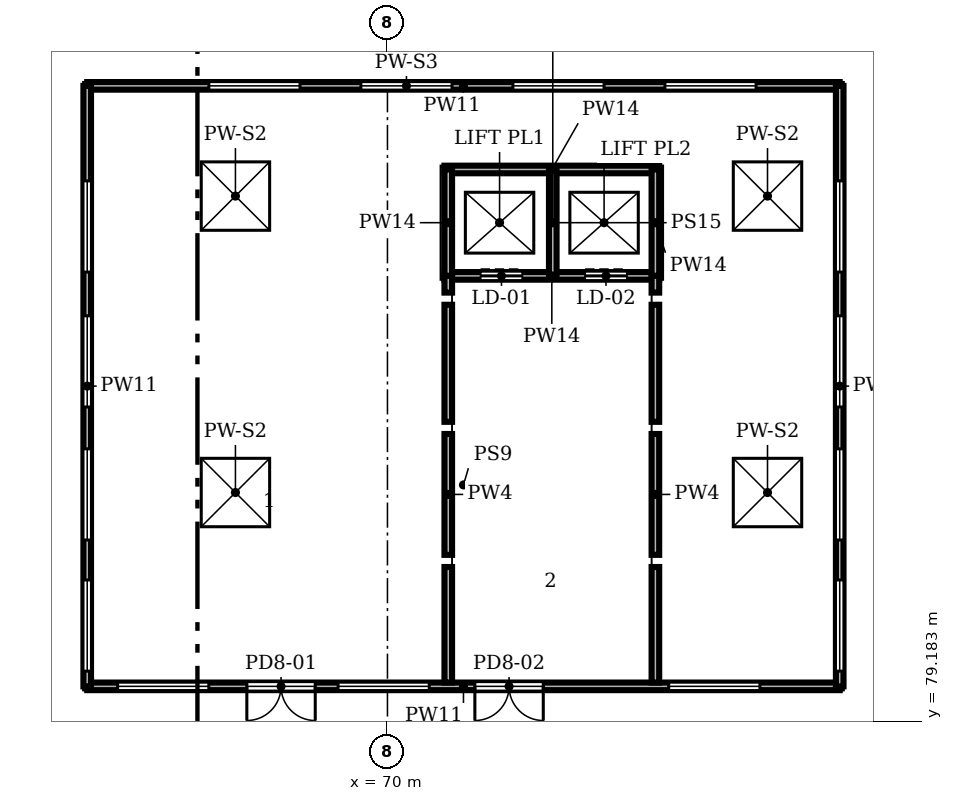
"""IFC4 building model, lengths in metres.
Left out: names, types, materials, properties, quantities, classifications, styles, units other than length and angle.
Written with IfcOpenShell. Run it as: python <this file> out.ifc"""

import sys

from ifc_helpers import new_model, si_unit, direction, frame, frame_2d, origin, origin_2d, place, context, subcontext, project, spatial, rectangle, extrude, element, fill, save


model = new_model("IFC4")
c1 = context("Model", 3, precision=1e-05, world=origin(), true_north=direction((0.0, 1.0)))
c2 = subcontext(c1, "Body", "Model", "MODEL_VIEW")
j1 = project(units=[si_unit("LENGTHUNIT", "METRE"), si_unit("PLANEANGLEUNIT", "RADIAN")], contexts=[c1])
p1 = place(None, origin())
s1 = spatial("IfcSite", under=j1, at=p1, CompositionType="ELEMENT")
p2 = place(p1, origin())
s2 = spatial("IfcBuilding", under=s1, at=p2, CompositionType="ELEMENT")
p3 = place(p2, frame((0.0, 0.0, 6.0)))
s3 = spatial("IfcBuildingStorey", under=s2, at=p3, CompositionType="ELEMENT", Elevation=6.0)
p4 = place(p3, frame((62.1, 80.1, -0.04), z_axis=(0.0, 0.0, 1.0), x_axis=(1.0, 0.0, 0.0)))
e1 = element("IfcWall", 1, at=p4, inside=s3, PredefinedType="STANDARD", context=c2, shape_type="SweptSolid", body=[
    extrude(rectangle(XDim=19.8, YDim=0.2, at=frame_2d((9.9, 0.0))), origin(), (0.0, 0.0, 1.0), 4.54),
])
p5 = place(p4, frame((0.8, 0.0, 0.5)))
e2 = element("IfcOpeningElement", 2, at=p5, cuts=e1, PredefinedType="OPENING", context=c2, shape_type="SweptSolid", body=[
    extrude(rectangle(XDim=2.4, YDim=2.6, at=frame_2d((1.2, 1.3))), frame((0.0, 0.11, 0.0), z_axis=(0.0, -1.0, 0.0), x_axis=(1.0, 0.0, 0.0)), (0.0, 0.0, 1.0), 0.22),
])
p6 = place(p4, frame((4.2, 0.0, 0.04)))
e3 = element("IfcOpeningElement", 3, at=p6, cuts=e1, PredefinedType="OPENING", context=c2, shape_type="SweptSolid", body=[
    extrude(rectangle(XDim=1.8, YDim=2.4, at=frame_2d((0.9, 1.2))), frame((0.0, 0.11, 0.0), z_axis=(0.0, -1.0, 0.0), x_axis=(1.0, 0.0, 0.0)), (0.0, 0.0, 1.0), 0.22),
])
p7 = place(p4, frame((6.6, 0.0, 0.5)))
e4 = element("IfcOpeningElement", 4, at=p7, cuts=e1, PredefinedType="OPENING", context=c2, shape_type="SweptSolid", body=[
    extrude(rectangle(XDim=2.4, YDim=2.6, at=frame_2d((1.2, 1.3))), frame((0.0, 0.11, 0.0), z_axis=(0.0, -1.0, 0.0), x_axis=(1.0, 0.0, 0.0)), (0.0, 0.0, 1.0), 0.22),
])
p8 = place(p4, frame((10.2, 0.0, 0.04)))
e5 = element("IfcOpeningElement", 5, at=p8, cuts=e1, PredefinedType="OPENING", context=c2, shape_type="SweptSolid", body=[
    extrude(rectangle(XDim=1.8, YDim=2.4, at=frame_2d((0.9, 1.2))), frame((0.0, 0.11, 0.0), z_axis=(0.0, -1.0, 0.0), x_axis=(1.0, 0.0, 0.0)), (0.0, 0.0, 1.0), 0.22),
])
p9 = place(p4, frame((15.3, 0.0, 0.5)))
e6 = element("IfcOpeningElement", 6, at=p9, cuts=e1, PredefinedType="OPENING", context=c2, shape_type="SweptSolid", body=[
    extrude(rectangle(XDim=2.4, YDim=2.6, at=frame_2d((1.2, 1.3))), frame((0.0, 0.11, 0.0), z_axis=(0.0, -1.0, 0.0), x_axis=(1.0, 0.0, 0.0)), (0.0, 0.0, 1.0), 0.22),
])
p10 = place(p3, frame((81.9, 80.1, -0.04), z_axis=(0.0, 0.0, 1.0), x_axis=(0.0, 1.0, 0.0)))
e7 = element("IfcWall", 7, at=p10, inside=s3, PredefinedType="STANDARD", context=c2, shape_type="SweptSolid", body=[
    extrude(rectangle(XDim=15.8, YDim=0.2, at=frame_2d((7.9, 0.0))), origin(), (0.0, 0.0, 1.0), 4.54),
])
p11 = place(p10, frame((0.4, 0.0, 0.5)))
e8 = element("IfcOpeningElement", 8, at=p11, cuts=e7, PredefinedType="OPENING", context=c2, shape_type="SweptSolid", body=[
    extrude(rectangle(XDim=2.4, YDim=2.6, at=frame_2d((1.2, 1.3))), frame((0.0, 0.11, 0.0), z_axis=(0.0, -1.0, 0.0), x_axis=(1.0, 0.0, 0.0)), (0.0, 0.0, 1.0), 0.22),
])
p12 = place(p10, frame((3.85, 0.0, 0.5)))
e9 = element("IfcOpeningElement", 9, at=p12, cuts=e7, PredefinedType="OPENING", context=c2, shape_type="SweptSolid", body=[
    extrude(rectangle(XDim=2.4, YDim=2.6, at=frame_2d((1.2, 1.3))), frame((0.0, 0.11, 0.0), z_axis=(0.0, -1.0, 0.0), x_axis=(1.0, 0.0, 0.0)), (0.0, 0.0, 1.0), 0.22),
])
p13 = place(p10, frame((7.35, 0.0, 0.5)))
e10 = element("IfcOpeningElement", 10, at=p13, cuts=e7, PredefinedType="OPENING", context=c2, shape_type="SweptSolid", body=[
    extrude(rectangle(XDim=2.4, YDim=2.6, at=frame_2d((1.2, 1.3))), frame((0.0, 0.11, 0.0), z_axis=(0.0, -1.0, 0.0), x_axis=(1.0, 0.0, 0.0)), (0.0, 0.0, 1.0), 0.22),
])
p14 = place(p10, frame((10.9, 0.0, 0.5)))
e11 = element("IfcOpeningElement", 11, at=p14, cuts=e7, PredefinedType="OPENING", context=c2, shape_type="SweptSolid", body=[
    extrude(rectangle(XDim=2.4, YDim=2.6, at=frame_2d((1.2, 1.3))), frame((0.0, 0.11, 0.0), z_axis=(0.0, -1.0, 0.0), x_axis=(1.0, 0.0, 0.0)), (0.0, 0.0, 1.0), 0.22),
])
p15 = place(p3, frame((81.9, 95.9, -0.04), z_axis=(0.0, 0.0, 1.0), x_axis=(-1.0, 0.0, 0.0)))
e12 = element("IfcWall", 12, at=p15, inside=s3, PredefinedType="STANDARD", context=c2, shape_type="SweptSolid", body=[
    extrude(rectangle(XDim=19.8, YDim=0.2, at=frame_2d((9.9, 0.0))), origin(), (0.0, 0.0, 1.0), 4.54),
])
p16 = place(p15, frame((2.2, 0.0, 0.5)))
e13 = element("IfcOpeningElement", 13, at=p16, cuts=e12, PredefinedType="OPENING", context=c2, shape_type="SweptSolid", body=[
    extrude(rectangle(XDim=2.4, YDim=2.6, at=frame_2d((1.2, 1.3))), frame((0.0, 0.11, 0.0), z_axis=(0.0, -1.0, 0.0), x_axis=(1.0, 0.0, 0.0)), (0.0, 0.0, 1.0), 0.22),
])
p17 = place(p15, frame((6.2, 0.0, 0.5)))
e14 = element("IfcOpeningElement", 14, at=p17, cuts=e12, PredefinedType="OPENING", context=c2, shape_type="SweptSolid", body=[
    extrude(rectangle(XDim=2.4, YDim=2.6, at=frame_2d((1.2, 1.3))), frame((0.0, 0.11, 0.0), z_axis=(0.0, -1.0, 0.0), x_axis=(1.0, 0.0, 0.0)), (0.0, 0.0, 1.0), 0.22),
])
p18 = place(p15, frame((10.2, 0.0, 0.5)))
e15 = element("IfcOpeningElement", 15, at=p18, cuts=e12, PredefinedType="OPENING", context=c2, shape_type="SweptSolid", body=[
    extrude(rectangle(XDim=2.4, YDim=2.6, at=frame_2d((1.2, 1.3))), frame((0.0, 0.11, 0.0), z_axis=(0.0, -1.0, 0.0), x_axis=(1.0, 0.0, 0.0)), (0.0, 0.0, 1.0), 0.22),
])
p19 = place(p15, frame((14.2, 0.0, 0.5)))
e16 = element("IfcOpeningElement", 16, at=p19, cuts=e12, PredefinedType="OPENING", context=c2, shape_type="SweptSolid", body=[
    extrude(rectangle(XDim=2.4, YDim=2.6, at=frame_2d((1.2, 1.3))), frame((0.0, 0.11, 0.0), z_axis=(0.0, -1.0, 0.0), x_axis=(1.0, 0.0, 0.0)), (0.0, 0.0, 1.0), 0.22),
])
p20 = place(p3, frame((62.1, 95.9, -0.04), z_axis=(0.0, 0.0, 1.0), x_axis=(0.0, -1.0, 0.0)))
e17 = element("IfcWall", 17, at=p20, inside=s3, PredefinedType="STANDARD", context=c2, shape_type="SweptSolid", body=[
    extrude(rectangle(XDim=15.8, YDim=0.2, at=frame_2d((7.9, 0.0))), origin(), (0.0, 0.0, 1.0), 4.54),
])
p21 = place(p20, frame((2.5, 0.0, 0.5)))
e18 = element("IfcOpeningElement", 18, at=p21, cuts=e17, PredefinedType="OPENING", context=c2, shape_type="SweptSolid", body=[
    extrude(rectangle(XDim=2.4, YDim=2.6, at=frame_2d((1.2, 1.3))), frame((0.0, 0.11, 0.0), z_axis=(0.0, -1.0, 0.0), x_axis=(1.0, 0.0, 0.0)), (0.0, 0.0, 1.0), 0.22),
])
p22 = place(p20, frame((6.05, 0.0, 0.5)))
e19 = element("IfcOpeningElement", 19, at=p22, cuts=e17, PredefinedType="OPENING", context=c2, shape_type="SweptSolid", body=[
    extrude(rectangle(XDim=2.4, YDim=2.6, at=frame_2d((1.2, 1.3))), frame((0.0, 0.11, 0.0), z_axis=(0.0, -1.0, 0.0), x_axis=(1.0, 0.0, 0.0)), (0.0, 0.0, 1.0), 0.22),
])
p23 = place(p20, frame((9.55, 0.0, 0.5)))
e20 = element("IfcOpeningElement", 20, at=p23, cuts=e17, PredefinedType="OPENING", context=c2, shape_type="SweptSolid", body=[
    extrude(rectangle(XDim=2.4, YDim=2.6, at=frame_2d((1.2, 1.3))), frame((0.0, 0.11, 0.0), z_axis=(0.0, -1.0, 0.0), x_axis=(1.0, 0.0, 0.0)), (0.0, 0.0, 1.0), 0.22),
])
p24 = place(p20, frame((13.0, 0.0, 0.5)))
e21 = element("IfcOpeningElement", 21, at=p24, cuts=e17, PredefinedType="OPENING", context=c2, shape_type="SweptSolid", body=[
    extrude(rectangle(XDim=2.4, YDim=2.6, at=frame_2d((1.2, 1.3))), frame((0.0, 0.11, 0.0), z_axis=(0.0, -1.0, 0.0), x_axis=(1.0, 0.0, 0.0)), (0.0, 0.0, 1.0), 0.22),
])
p25 = place(p3, frame((71.5, 90.9, 0.0), z_axis=(0.0, 0.0, 1.0), x_axis=(1.0, 0.0, 0.0)))
e22 = element("IfcWall", 22, at=p25, inside=s3, PredefinedType="SOLIDWALL", context=c2, shape_type="SweptSolid", body=[
    extrude(rectangle(XDim=5.65, YDim=0.2, at=frame_2d((2.825, 0.0))), origin(), (0.0, 0.0, 1.0), 5.5),
])
p26 = place(p25, frame((0.95, 0.0, 0.0)))
e23 = element("IfcOpeningElement", 23, at=p26, cuts=e22, PredefinedType="OPENING", context=c2, shape_type="SweptSolid", body=[
    extrude(rectangle(XDim=1.1, YDim=2.1, at=frame_2d((0.55, 1.05))), frame((0.0, 0.11, 0.0), z_axis=(0.0, -1.0, 0.0), x_axis=(1.0, 0.0, 0.0)), (0.0, 0.0, 1.0), 0.22),
])
p27 = place(p25, frame((3.7, 0.0, 0.0)))
e24 = element("IfcOpeningElement", 24, at=p27, cuts=e22, PredefinedType="OPENING", context=c2, shape_type="SweptSolid", body=[
    extrude(rectangle(XDim=1.1, YDim=2.1, at=frame_2d((0.55, 1.05))), frame((0.0, 0.11, 0.0), z_axis=(0.0, -1.0, 0.0), x_axis=(1.0, 0.0, 0.0)), (0.0, 0.0, 1.0), 0.22),
])
p28 = place(p3, frame((71.5, 93.7, 0.0), z_axis=(0.0, 0.0, 1.0), x_axis=(1.0, 0.0, 0.0)))
e25 = element("IfcWall", 25, at=p28, inside=s3, PredefinedType="SOLIDWALL", context=c2, shape_type="SweptSolid", body=[
    extrude(rectangle(XDim=5.65, YDim=0.2, at=frame_2d((2.825, 0.0))), origin(), (0.0, 0.0, 1.0), 5.5),
])
for number, where, z_axis, x_axis in (
    (26, (71.6, 90.9, 0.0), (0.0, 0.0, 1.0), (0.0, 1.0, 0.0)),
    (27, (74.35, 90.9, 0.0), (0.0, 0.0, 1.0), (0.0, 1.0, 0.0)),
    (28, (77.05, 90.9, 0.0), (0.0, 0.0, 1.0), (0.0, 1.0, 0.0)),
):
    element("IfcWall", number, at=place(p3, frame(where, z_axis=z_axis, x_axis=x_axis)), inside=s3, PredefinedType="SOLIDWALL", context=c2, shape_type="SweptSolid", body=[
        extrude(rectangle(XDim=2.8, YDim=0.2, at=frame_2d((1.4, 0.0))), origin(), (0.0, 0.0, 1.0), 5.5),
    ])
p29 = place(p3, frame((71.6, 80.2, 0.0), z_axis=(0.0, 0.0, 1.0), x_axis=(0.0, 1.0, 0.0)))
e29 = element("IfcWall", 29, at=p29, inside=s3, PredefinedType="PARTITIONING", context=c2, shape_type="SweptSolid", body=[
    extrude(rectangle(XDim=3.04, YDim=0.2, at=frame_2d((1.52, 0.0))), origin(), (0.0, 0.0, 1.0), 4.5),
])
p30 = place(p3, frame((71.6, 83.56, 0.0), z_axis=(0.0, 0.0, 1.0), x_axis=(0.0, 1.0, 0.0)))
e30 = element("IfcWall", 30, at=p30, inside=s3, PredefinedType="PARTITIONING", context=c2, shape_type="SweptSolid", body=[
    extrude(rectangle(XDim=3.18, YDim=0.2, at=frame_2d((1.59, 0.0))), origin(), (0.0, 0.0, 1.0), 4.5),
])
p31 = place(p3, frame((71.6, 87.06, 0.0), z_axis=(0.0, 0.0, 1.0), x_axis=(0.0, 1.0, 0.0)))
e31 = element("IfcWall", 31, at=p31, inside=s3, PredefinedType="PARTITIONING", context=c2, shape_type="SweptSolid", body=[
    extrude(rectangle(XDim=3.08, YDim=0.2, at=frame_2d((1.54, 0.0))), origin(), (0.0, 0.0, 1.0), 4.5),
])
p32 = place(p3, frame((71.6, 90.46, 0.0), z_axis=(0.0, 0.0, 1.0), x_axis=(0.0, 1.0, 0.0)))
e32 = element("IfcWall", 32, at=p32, inside=s3, PredefinedType="PARTITIONING", context=c2, shape_type="SweptSolid", body=[
    extrude(rectangle(XDim=0.44, YDim=0.2, at=frame_2d((0.22, 0.0))), origin(), (0.0, 0.0, 1.0), 4.5),
])
p33 = place(p3, frame((77.05, 80.2, 0.0), z_axis=(0.0, 0.0, 1.0), x_axis=(0.0, 1.0, 0.0)))
e33 = element("IfcWall", 33, at=p33, inside=s3, PredefinedType="PARTITIONING", context=c2, shape_type="SweptSolid", body=[
    extrude(rectangle(XDim=3.04, YDim=0.2, at=frame_2d((1.52, 0.0))), origin(), (0.0, 0.0, 1.0), 4.5),
])
p34 = place(p3, frame((77.05, 83.56, 0.0), z_axis=(0.0, 0.0, 1.0), x_axis=(0.0, 1.0, 0.0)))
e34 = element("IfcWall", 34, at=p34, inside=s3, PredefinedType="PARTITIONING", context=c2, shape_type="SweptSolid", body=[
    extrude(rectangle(XDim=3.18, YDim=0.2, at=frame_2d((1.59, 0.0))), origin(), (0.0, 0.0, 1.0), 4.5),
])
p35 = place(p3, frame((77.05, 87.06, 0.0), z_axis=(0.0, 0.0, 1.0), x_axis=(0.0, 1.0, 0.0)))
e35 = element("IfcWall", 35, at=p35, inside=s3, PredefinedType="PARTITIONING", context=c2, shape_type="SweptSolid", body=[
    extrude(rectangle(XDim=3.08, YDim=0.2, at=frame_2d((1.54, 0.0))), origin(), (0.0, 0.0, 1.0), 4.5),
])
p36 = place(p3, frame((77.05, 90.46, 0.0), z_axis=(0.0, 0.0, 1.0), x_axis=(0.0, 1.0, 0.0)))
e36 = element("IfcWall", 36, at=p36, inside=s3, PredefinedType="PARTITIONING", context=c2, shape_type="SweptSolid", body=[
    extrude(rectangle(XDim=0.44, YDim=0.2, at=frame_2d((0.22, 0.0))), origin(), (0.0, 0.0, 1.0), 4.5),
])
p37 = place(p5, origin())
e37 = element("IfcWindow", 37, at=p37, inside=s3, PartitioningType="SINGLE_PANEL", PredefinedType="WINDOW", context=c2, shape_type="SweptSolid", body=[
    extrude(rectangle(XDim=2.4, YDim=2.6, at=frame_2d((1.2, 1.3))), frame((0.0, 0.03, 0.0), z_axis=(0.0, -1.0, 0.0), x_axis=(1.0, 0.0, 0.0)), (0.0, 0.0, 1.0), 0.06),
])
fill(e2, e37)
p38 = place(p6, frame((1.8, 0.0, 0.0), z_axis=(0.0, 0.0, 1.0), x_axis=(-1.0, 0.0, 0.0)))
e38 = element("IfcDoor", 38, at=p38, inside=s3, OperationType="DOUBLE_DOOR_SINGLE_SWING", PredefinedType="DOOR", context=c2, shape_type="SweptSolid", body=[
    extrude(rectangle(XDim=1.8, YDim=2.4, at=frame_2d((0.9, 1.2))), frame((0.0, 0.025, 0.0), z_axis=(0.0, -1.0, 0.0), x_axis=(1.0, 0.0, 0.0)), (0.0, 0.0, 1.0), 0.05),
])
fill(e3, e38)
p39 = place(p7, origin())
e39 = element("IfcWindow", 39, at=p39, inside=s3, PartitioningType="SINGLE_PANEL", PredefinedType="WINDOW", context=c2, shape_type="SweptSolid", body=[
    extrude(rectangle(XDim=2.4, YDim=2.6, at=frame_2d((1.2, 1.3))), frame((0.0, 0.03, 0.0), z_axis=(0.0, -1.0, 0.0), x_axis=(1.0, 0.0, 0.0)), (0.0, 0.0, 1.0), 0.06),
])
fill(e4, e39)
p40 = place(p8, frame((1.8, 0.0, 0.0), z_axis=(0.0, 0.0, 1.0), x_axis=(-1.0, 0.0, 0.0)))
e40 = element("IfcDoor", 40, at=p40, inside=s3, OperationType="DOUBLE_DOOR_SINGLE_SWING", PredefinedType="DOOR", context=c2, shape_type="SweptSolid", body=[
    extrude(rectangle(XDim=1.8, YDim=2.4, at=frame_2d((0.9, 1.2))), frame((0.0, 0.025, 0.0), z_axis=(0.0, -1.0, 0.0), x_axis=(1.0, 0.0, 0.0)), (0.0, 0.0, 1.0), 0.05),
])
fill(e5, e40)
p41 = place(p9, origin())
e41 = element("IfcWindow", 41, at=p41, inside=s3, PartitioningType="SINGLE_PANEL", PredefinedType="WINDOW", context=c2, shape_type="SweptSolid", body=[
    extrude(rectangle(XDim=2.4, YDim=2.6, at=frame_2d((1.2, 1.3))), frame((0.0, 0.03, 0.0), z_axis=(0.0, -1.0, 0.0), x_axis=(1.0, 0.0, 0.0)), (0.0, 0.0, 1.0), 0.06),
])
fill(e6, e41)
p42 = place(p11, origin())
e42 = element("IfcWindow", 42, at=p42, inside=s3, PartitioningType="SINGLE_PANEL", PredefinedType="WINDOW", context=c2, shape_type="SweptSolid", body=[
    extrude(rectangle(XDim=2.4, YDim=2.6, at=frame_2d((1.2, 1.3))), frame((0.0, 0.03, 0.0), z_axis=(0.0, -1.0, 0.0), x_axis=(1.0, 0.0, 0.0)), (0.0, 0.0, 1.0), 0.06),
])
fill(e8, e42)
p43 = place(p12, origin())
e43 = element("IfcWindow", 43, at=p43, inside=s3, PartitioningType="SINGLE_PANEL", PredefinedType="WINDOW", context=c2, shape_type="SweptSolid", body=[
    extrude(rectangle(XDim=2.4, YDim=2.6, at=frame_2d((1.2, 1.3))), frame((0.0, 0.03, 0.0), z_axis=(0.0, -1.0, 0.0), x_axis=(1.0, 0.0, 0.0)), (0.0, 0.0, 1.0), 0.06),
])
fill(e9, e43)
p44 = place(p13, origin())
e44 = element("IfcWindow", 44, at=p44, inside=s3, PartitioningType="SINGLE_PANEL", PredefinedType="WINDOW", context=c2, shape_type="SweptSolid", body=[
    extrude(rectangle(XDim=2.4, YDim=2.6, at=frame_2d((1.2, 1.3))), frame((0.0, 0.03, 0.0), z_axis=(0.0, -1.0, 0.0), x_axis=(1.0, 0.0, 0.0)), (0.0, 0.0, 1.0), 0.06),
])
fill(e10, e44)
p45 = place(p14, origin())
e45 = element("IfcWindow", 45, at=p45, inside=s3, PartitioningType="SINGLE_PANEL", PredefinedType="WINDOW", context=c2, shape_type="SweptSolid", body=[
    extrude(rectangle(XDim=2.4, YDim=2.6, at=frame_2d((1.2, 1.3))), frame((0.0, 0.03, 0.0), z_axis=(0.0, -1.0, 0.0), x_axis=(1.0, 0.0, 0.0)), (0.0, 0.0, 1.0), 0.06),
])
fill(e11, e45)
p46 = place(p21, origin())
e46 = element("IfcWindow", 46, at=p46, inside=s3, PartitioningType="SINGLE_PANEL", PredefinedType="WINDOW", context=c2, shape_type="SweptSolid", body=[
    extrude(rectangle(XDim=2.4, YDim=2.6, at=frame_2d((1.2, 1.3))), frame((0.0, 0.03, 0.0), z_axis=(0.0, -1.0, 0.0), x_axis=(1.0, 0.0, 0.0)), (0.0, 0.0, 1.0), 0.06),
])
fill(e18, e46)
p47 = place(p22, origin())
e47 = element("IfcWindow", 47, at=p47, inside=s3, PartitioningType="SINGLE_PANEL", PredefinedType="WINDOW", context=c2, shape_type="SweptSolid", body=[
    extrude(rectangle(XDim=2.4, YDim=2.6, at=frame_2d((1.2, 1.3))), frame((0.0, 0.03, 0.0), z_axis=(0.0, -1.0, 0.0), x_axis=(1.0, 0.0, 0.0)), (0.0, 0.0, 1.0), 0.06),
])
fill(e19, e47)
p48 = place(p23, origin())
e48 = element("IfcWindow", 48, at=p48, inside=s3, PartitioningType="SINGLE_PANEL", PredefinedType="WINDOW", context=c2, shape_type="SweptSolid", body=[
    extrude(rectangle(XDim=2.4, YDim=2.6, at=frame_2d((1.2, 1.3))), frame((0.0, 0.03, 0.0), z_axis=(0.0, -1.0, 0.0), x_axis=(1.0, 0.0, 0.0)), (0.0, 0.0, 1.0), 0.06),
])
fill(e20, e48)
p49 = place(p24, origin())
e49 = element("IfcWindow", 49, at=p49, inside=s3, PartitioningType="SINGLE_PANEL", PredefinedType="WINDOW", context=c2, shape_type="SweptSolid", body=[
    extrude(rectangle(XDim=2.4, YDim=2.6, at=frame_2d((1.2, 1.3))), frame((0.0, 0.03, 0.0), z_axis=(0.0, -1.0, 0.0), x_axis=(1.0, 0.0, 0.0)), (0.0, 0.0, 1.0), 0.06),
])
fill(e21, e49)
p50 = place(p16, origin())
e50 = element("IfcWindow", 50, at=p50, inside=s3, PartitioningType="SINGLE_PANEL", PredefinedType="WINDOW", context=c2, shape_type="SweptSolid", body=[
    extrude(rectangle(XDim=2.4, YDim=2.6, at=frame_2d((1.2, 1.3))), frame((0.0, 0.03, 0.0), z_axis=(0.0, -1.0, 0.0), x_axis=(1.0, 0.0, 0.0)), (0.0, 0.0, 1.0), 0.06),
])
fill(e13, e50)
p51 = place(p17, origin())
e51 = element("IfcWindow", 51, at=p51, inside=s3, PartitioningType="SINGLE_PANEL", PredefinedType="WINDOW", context=c2, shape_type="SweptSolid", body=[
    extrude(rectangle(XDim=2.4, YDim=2.6, at=frame_2d((1.2, 1.3))), frame((0.0, 0.03, 0.0), z_axis=(0.0, -1.0, 0.0), x_axis=(1.0, 0.0, 0.0)), (0.0, 0.0, 1.0), 0.06),
])
fill(e14, e51)
p52 = place(p18, origin())
e52 = element("IfcWindow", 52, at=p52, inside=s3, PartitioningType="SINGLE_PANEL", PredefinedType="WINDOW", context=c2, shape_type="SweptSolid", body=[
    extrude(rectangle(XDim=2.4, YDim=2.6, at=frame_2d((1.2, 1.3))), frame((0.0, 0.03, 0.0), z_axis=(0.0, -1.0, 0.0), x_axis=(1.0, 0.0, 0.0)), (0.0, 0.0, 1.0), 0.06),
])
fill(e15, e52)
p53 = place(p19, origin())
e53 = element("IfcWindow", 53, at=p53, inside=s3, PartitioningType="SINGLE_PANEL", PredefinedType="WINDOW", context=c2, shape_type="SweptSolid", body=[
    extrude(rectangle(XDim=2.4, YDim=2.6, at=frame_2d((1.2, 1.3))), frame((0.0, 0.03, 0.0), z_axis=(0.0, -1.0, 0.0), x_axis=(1.0, 0.0, 0.0)), (0.0, 0.0, 1.0), 0.06),
])
fill(e16, e53)
p54 = place(p3, frame((0.0, 0.0, 4.5)))
p55 = place(p54, frame((66.0, 85.2, 0.0)))
p56 = place(p55, frame((0.0, 0.0, 0.2)))
e54 = element("IfcWindow", 54, at=p56, inside=s3, PartitioningType="SINGLE_PANEL", PredefinedType="SKYLIGHT", context=c2, shape_type="SweptSolid", body=[
    extrude(rectangle(XDim=1.8, YDim=1.8, at=origin_2d()), origin(), (0.0, 0.0, 1.0), 0.05),
])
p57 = place(p54, frame((80.0, 85.2, 0.0)))
p58 = place(p57, frame((0.0, 0.0, 0.2)))
e55 = element("IfcWindow", 55, at=p58, inside=s3, PartitioningType="SINGLE_PANEL", PredefinedType="SKYLIGHT", context=c2, shape_type="SweptSolid", body=[
    extrude(rectangle(XDim=1.8, YDim=1.8, at=origin_2d()), origin(), (0.0, 0.0, 1.0), 0.05),
])
p59 = place(p54, frame((66.0, 93.0, 0.0)))
p60 = place(p59, frame((0.0, 0.0, 0.2)))
e56 = element("IfcWindow", 56, at=p60, inside=s3, PartitioningType="SINGLE_PANEL", PredefinedType="SKYLIGHT", context=c2, shape_type="SweptSolid", body=[
    extrude(rectangle(XDim=1.8, YDim=1.8, at=origin_2d()), origin(), (0.0, 0.0, 1.0), 0.05),
])
p61 = place(p54, frame((80.0, 93.0, 0.0)))
p62 = place(p61, frame((0.0, 0.0, 0.2)))
e57 = element("IfcWindow", 57, at=p62, inside=s3, PartitioningType="SINGLE_PANEL", PredefinedType="SKYLIGHT", context=c2, shape_type="SweptSolid", body=[
    extrude(rectangle(XDim=1.8, YDim=1.8, at=origin_2d()), origin(), (0.0, 0.0, 1.0), 0.05),
])
p63 = place(p26, origin())
e58 = element("IfcDoor", 58, at=p63, inside=s3, OperationType="DOUBLE_DOOR_SLIDING", PredefinedType="DOOR", context=c2, shape_type="SweptSolid", body=[
    extrude(rectangle(XDim=1.1, YDim=2.1, at=frame_2d((0.55, 1.05))), frame((0.0, 0.025, 0.0), z_axis=(0.0, -1.0, 0.0), x_axis=(1.0, 0.0, 0.0)), (0.0, 0.0, 1.0), 0.05),
])
fill(e23, e58)
p64 = place(p27, origin())
e59 = element("IfcDoor", 59, at=p64, inside=s3, OperationType="DOUBLE_DOOR_SLIDING", PredefinedType="DOOR", context=c2, shape_type="SweptSolid", body=[
    extrude(rectangle(XDim=1.1, YDim=2.1, at=frame_2d((0.55, 1.05))), frame((0.0, 0.025, 0.0), z_axis=(0.0, -1.0, 0.0), x_axis=(1.0, 0.0, 0.0)), (0.0, 0.0, 1.0), 0.05),
])
fill(e24, e59)
save(model, sys.argv[1])
